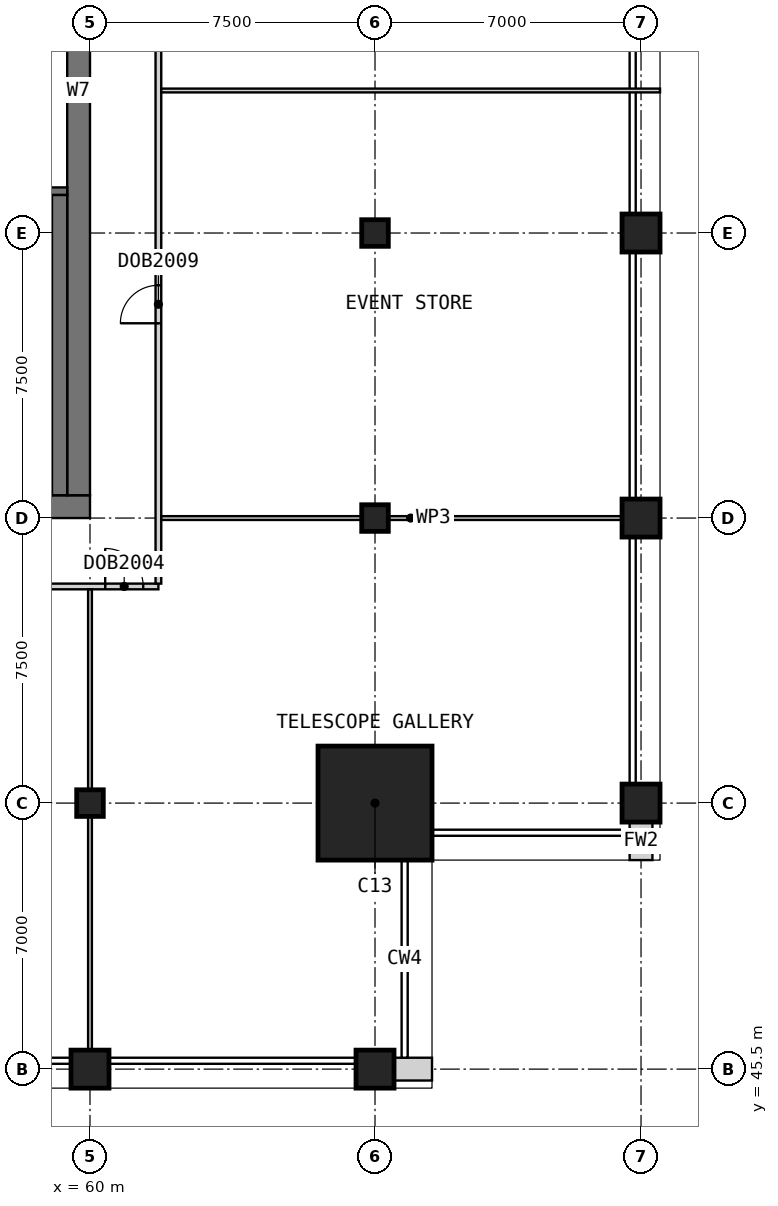
"""IFC4 building model, lengths in metres.
Left out: names, types, materials, properties, quantities, classifications, styles, units other than length and angle.
Written with IfcOpenShell. Run it as: python <this file> out.ifc"""

import sys

from ifc_helpers import new_model, si_unit, direction, frame, frame_2d, origin, origin_2d, place, context, subcontext, project, spatial, rectangle, extrude, element, fill, save


model = new_model("IFC4")
c1 = context("Model", 3, precision=1e-05, world=origin(), true_north=direction((0.0, 1.0)))
c2 = subcontext(c1, "Body", "Model", "MODEL_VIEW")
j1 = project(units=[si_unit("LENGTHUNIT", "METRE"), si_unit("PLANEANGLEUNIT", "RADIAN")], contexts=[c1])
p1 = place(None, origin())
s1 = spatial("IfcSite", under=j1, at=p1, CompositionType="ELEMENT")
p2 = place(p1, origin())
s2 = spatial("IfcBuilding", under=s1, at=p2, CompositionType="ELEMENT")
p3 = place(p2, frame((0.0, 0.0, 308.7)))
s3 = spatial("IfcBuildingStorey", under=s2, at=p3, CompositionType="ELEMENT", Elevation=308.7)
p4 = place(p3, frame((60.0, 45.5, 0.0), z_axis=(0.0, 0.0, 1.0), x_axis=(1.0, 0.0, 0.0)))
e1 = element("IfcColumn", 1, at=p4, inside=s3, PredefinedType="COLUMN", context=c2, shape_type="SweptSolid", body=[
    extrude(rectangle(XDim=1.0, YDim=1.0, at=origin_2d()), origin(), (0.0, 0.0, 1.0), 6.0),
])
p5 = place(p3, frame((60.0, 52.5, 0.0), z_axis=(0.0, 0.0, 1.0), x_axis=(1.0, 0.0, 0.0)))
e2 = element("IfcColumn", 2, at=p5, inside=s3, PredefinedType="COLUMN", context=c2, shape_type="SweptSolid", body=[
    extrude(rectangle(XDim=0.7, YDim=0.7, at=origin_2d()), origin(), (0.0, 0.0, 1.0), 6.0),
])
p6 = place(p3, frame((67.5, 45.5, 0.0), z_axis=(0.0, 0.0, 1.0), x_axis=(1.0, 0.0, 0.0)))
e3 = element("IfcColumn", 3, at=p6, inside=s3, PredefinedType="COLUMN", context=c2, shape_type="SweptSolid", body=[
    extrude(rectangle(XDim=1.0, YDim=1.0, at=origin_2d()), origin(), (0.0, 0.0, 1.0), 6.0),
])
for number, where, z_axis, x_axis in (
    (4, (67.5, 60.0, 0.0), (0.0, 0.0, 1.0), (1.0, 0.0, 0.0)),
    (5, (67.5, 67.5, 0.0), (0.0, 0.0, 1.0), (1.0, 0.0, 0.0)),
):
    element("IfcColumn", number, at=place(p3, frame(where, z_axis=z_axis, x_axis=x_axis)), inside=s3, PredefinedType="COLUMN", context=c2, shape_type="SweptSolid", body=[
        extrude(rectangle(XDim=0.7, YDim=0.7, at=origin_2d()), origin(), (0.0, 0.0, 1.0), 6.0),
    ])
for number, where, z_axis, x_axis in (
    (6, (74.5, 52.5, 0.0), (0.0, 0.0, 1.0), (1.0, 0.0, 0.0)),
    (7, (74.5, 60.0, 0.0), (0.0, 0.0, 1.0), (1.0, 0.0, 0.0)),
    (8, (74.5, 67.5, 0.0), (0.0, 0.0, 1.0), (1.0, 0.0, 0.0)),
):
    element("IfcColumn", number, at=place(p3, frame(where, z_axis=z_axis, x_axis=x_axis)), inside=s3, PredefinedType="COLUMN", context=c2, shape_type="SweptSolid", body=[
        extrude(rectangle(XDim=1.0, YDim=1.0, at=origin_2d()), origin(), (0.0, 0.0, 1.0), 6.0),
    ])
p7 = place(p3, frame((67.5, 52.5, 0.0), z_axis=(0.0, 0.0, 1.0), x_axis=(1.0, 0.0, 0.0)))
e9 = element("IfcColumn", 9, at=p7, inside=s3, PredefinedType="COLUMN", context=c2, shape_type="SweptSolid", body=[
    extrude(rectangle(XDim=3.0, YDim=3.0, at=origin_2d()), origin(), (0.0, 0.0, 1.0), 6.0),
])
p8 = place(p3, frame((30.0, 60.3, 0.0), z_axis=(0.0, 0.0, 1.0), x_axis=(1.0, 0.0, 0.0)))
e10 = element("IfcWall", 10, at=p8, inside=s3, PredefinedType="SHEAR", context=c2, shape_type="SweptSolid", body=[
    extrude(rectangle(XDim=30.0, YDim=0.6, at=frame_2d((15.0, 0.0))), origin(), (0.0, 0.0, 1.0), 6.0),
])
p9 = place(p8, frame((21.9, 0.0, 0.0)))
e11 = element("IfcOpeningElement", 11, at=p9, cuts=e10, PredefinedType="OPENING", context=c2, shape_type="SweptSolid", body=[
    extrude(rectangle(XDim=1.8, YDim=2.1, at=frame_2d((0.9, 1.05))), frame((0.0, 0.31, 0.0), z_axis=(0.0, -1.0, 0.0), x_axis=(1.0, 0.0, 0.0)), (0.0, 0.0, 1.0), 0.62),
])
p10 = place(p8, frame((26.5, 0.0, 0.0)))
e12 = element("IfcOpeningElement", 12, at=p10, cuts=e10, PredefinedType="OPENING", context=c2, shape_type="SweptSolid", body=[
    extrude(rectangle(XDim=1.2, YDim=2.1, at=frame_2d((0.6, 1.05))), frame((0.0, 0.31, 0.0), z_axis=(0.0, -1.0, 0.0), x_axis=(1.0, 0.0, 0.0)), (0.0, 0.0, 1.0), 0.62),
])
p11 = place(p3, frame((59.7, 60.6, 0.0), z_axis=(0.0, 0.0, 1.0), x_axis=(0.0, 1.0, 0.0)))
e13 = element("IfcWall", 13, at=p11, inside=s3, PredefinedType="SHEAR", context=c2, shape_type="SweptSolid", body=[
    extrude(rectangle(XDim=21.3, YDim=0.6, at=frame_2d((10.65, 0.0))), origin(), (0.0, 0.0, 1.0), 6.0),
])
p12 = place(p11, frame((14.9, 0.0, 0.0)))
e14 = element("IfcOpeningElement", 14, at=p12, cuts=e13, PredefinedType="OPENING", context=c2, shape_type="SweptSolid", body=[
    extrude(rectangle(XDim=1.8, YDim=2.1, at=frame_2d((0.9, 1.05))), frame((0.0, 0.31, 0.0), z_axis=(0.0, -1.0, 0.0), x_axis=(1.0, 0.0, 0.0)), (0.0, 0.0, 1.0), 0.62),
])
for number, where, z_axis, x_axis in (
    (15, (68.0, 45.5, 0.0), (0.0, 0.0, 1.0), (1.0, 0.0, 0.0)),
    (16, (74.5, 51.0, 0.0), (0.0, 0.0, 1.0), (0.0, 1.0, 0.0)),
):
    element("IfcWall", number, at=place(p3, frame(where, z_axis=z_axis, x_axis=x_axis)), inside=s3, PredefinedType="SOLIDWALL", context=c2, shape_type="SweptSolid", body=[
        extrude(rectangle(XDim=1.0, YDim=0.6, at=frame_2d((0.5, 0.0))), origin(), (0.0, 0.0, 1.0), 5.6),
    ])
p13 = place(p3, frame((51.1, 68.6, 0.0), z_axis=(0.0, 0.0, 1.0), x_axis=(1.0, 0.0, 0.0)))
e17 = element("IfcWall", 17, at=p13, inside=s3, PredefinedType="SOLIDWALL", context=c2, shape_type="SweptSolid", body=[
    extrude(rectangle(XDim=8.3, YDim=0.2, at=frame_2d((4.15, 0.0))), origin(), (0.0, 0.0, 1.0), 5.59),
])
p14 = place(p3, frame((59.2, 60.6, 0.0), z_axis=(0.0, 0.0, 1.0), x_axis=(0.0, 1.0, 0.0)))
e18 = element("IfcWall", 18, at=p14, inside=s3, PredefinedType="SOLIDWALL", context=c2, shape_type="SweptSolid", body=[
    extrude(rectangle(XDim=7.9, YDim=0.4, at=frame_2d((3.95, 0.0))), origin(), (0.0, 0.0, 1.0), 5.59),
])
p15 = place(p3, frame((33.75, 58.2, 0.0), z_axis=(0.0, 0.0, 1.0), x_axis=(1.0, 0.0, 0.0)))
e19 = element("IfcWall", 19, at=p15, inside=s3, PredefinedType="PARTITIONING", context=c2, shape_type="SweptSolid", body=[
    extrude(rectangle(XDim=28.05, YDim=0.15, at=frame_2d((14.025, 0.0))), origin(), (0.0, 0.0, 1.0), 5.6),
])
p16 = place(p15, frame((6.6, 0.0, 0.0)))
e20 = element("IfcOpeningElement", 20, at=p16, cuts=e19, PredefinedType="OPENING", context=c2, shape_type="SweptSolid", body=[
    extrude(rectangle(XDim=1.8, YDim=2.1, at=frame_2d((0.9, 1.05))), frame((0.0, 0.085, 0.0), z_axis=(0.0, -1.0, 0.0), x_axis=(1.0, 0.0, 0.0)), (0.0, 0.0, 1.0), 0.17),
])
p17 = place(p15, frame((19.725, 0.0, 0.0)))
e21 = element("IfcOpeningElement", 21, at=p17, cuts=e19, PredefinedType="OPENING", context=c2, shape_type="SweptSolid", body=[
    extrude(rectangle(XDim=1.8, YDim=2.1, at=frame_2d((0.9, 1.05))), frame((0.0, 0.085, 0.0), z_axis=(0.0, -1.0, 0.0), x_axis=(1.0, 0.0, 0.0)), (0.0, 0.0, 1.0), 0.17),
])
p18 = place(p15, frame((26.65, 0.0, 0.0)))
e22 = element("IfcOpeningElement", 22, at=p18, cuts=e19, PredefinedType="OPENING", context=c2, shape_type="SweptSolid", body=[
    extrude(rectangle(XDim=1.0, YDim=2.1, at=frame_2d((0.5, 1.05))), frame((0.0, 0.085, 0.0), z_axis=(0.0, -1.0, 0.0), x_axis=(1.0, 0.0, 0.0)), (0.0, 0.0, 1.0), 0.17),
])
p19 = place(p3, frame((61.8, 58.275, 0.0), z_axis=(0.0, 0.0, 1.0), x_axis=(0.0, 1.0, 0.0)))
e23 = element("IfcWall", 23, at=p19, inside=s3, PredefinedType="PARTITIONING", context=c2, shape_type="SweptSolid", body=[
    extrude(rectangle(XDim=25.95, YDim=0.15, at=frame_2d((12.975, 0.0))), origin(), (0.0, 0.0, 1.0), 5.6),
])
p20 = place(p19, frame((6.85, 0.0, 0.0)))
e24 = element("IfcOpeningElement", 24, at=p20, cuts=e23, PredefinedType="OPENING", context=c2, shape_type="SweptSolid", body=[
    extrude(rectangle(XDim=1.0, YDim=2.1, at=frame_2d((0.5, 1.05))), frame((0.0, 0.085, 0.0), z_axis=(0.0, -1.0, 0.0), x_axis=(1.0, 0.0, 0.0)), (0.0, 0.0, 1.0), 0.17),
])
p21 = place(p19, frame((14.35, 0.0, 0.0)))
e25 = element("IfcOpeningElement", 25, at=p21, cuts=e23, PredefinedType="OPENING", context=c2, shape_type="SweptSolid", body=[
    extrude(rectangle(XDim=1.0, YDim=2.1, at=frame_2d((0.5, 1.05))), frame((0.0, 0.085, 0.0), z_axis=(0.0, -1.0, 0.0), x_axis=(1.0, 0.0, 0.0)), (0.0, 0.0, 1.0), 0.17),
])
p22 = place(p19, frame((18.15, 0.0, 0.0)))
e26 = element("IfcOpeningElement", 26, at=p22, cuts=e23, PredefinedType="OPENING", context=c2, shape_type="SweptSolid", body=[
    extrude(rectangle(XDim=0.9, YDim=2.1, at=frame_2d((0.45, 1.05))), frame((0.0, 0.085, 0.0), z_axis=(0.0, -1.0, 0.0), x_axis=(1.0, 0.0, 0.0)), (0.0, 0.0, 1.0), 0.17),
])
for number, where, z_axis, x_axis in (
    (27, (61.875, 60.0, 0.0), (0.0, 0.0, 1.0), (1.0, 0.0, 0.0)),
    (28, (61.875, 71.25, 0.0), (0.0, 0.0, 1.0), (1.0, 0.0, 0.0)),
    (29, (60.0, 45.0, 0.0), (0.0, 0.0, 1.0), (0.0, 1.0, 0.0)),
):
    element("IfcWall", number, at=place(p3, frame(where, z_axis=z_axis, x_axis=x_axis)), inside=s3, PredefinedType="PARTITIONING", context=c2, shape_type="SweptSolid", body=[
        extrude(rectangle(XDim=13.125, YDim=0.1, at=frame_2d((6.562, 0.0))), origin(), (0.0, 0.0, 1.0), 5.6),
    ])
p23 = place(p18, origin())
e30 = element("IfcDoor", 30, at=p23, inside=s3, OperationType="SINGLE_SWING_RIGHT", PredefinedType="DOOR", context=c2, shape_type="SweptSolid", body=[
    extrude(rectangle(XDim=1.0, YDim=2.1, at=frame_2d((0.5, 1.05))), frame((0.0, 0.025, 0.0), z_axis=(0.0, -1.0, 0.0), x_axis=(1.0, 0.0, 0.0)), (0.0, 0.0, 1.0), 0.05),
])
fill(e22, e30)
p24 = place(p20, origin())
e31 = element("IfcDoor", 31, at=p24, inside=s3, OperationType="SINGLE_SWING_RIGHT", PredefinedType="DOOR", context=c2, shape_type="SweptSolid", body=[
    extrude(rectangle(XDim=1.0, YDim=2.1, at=frame_2d((0.5, 1.05))), frame((0.0, 0.025, 0.0), z_axis=(0.0, -1.0, 0.0), x_axis=(1.0, 0.0, 0.0)), (0.0, 0.0, 1.0), 0.05),
])
fill(e24, e31)
save(model, sys.argv[1])
